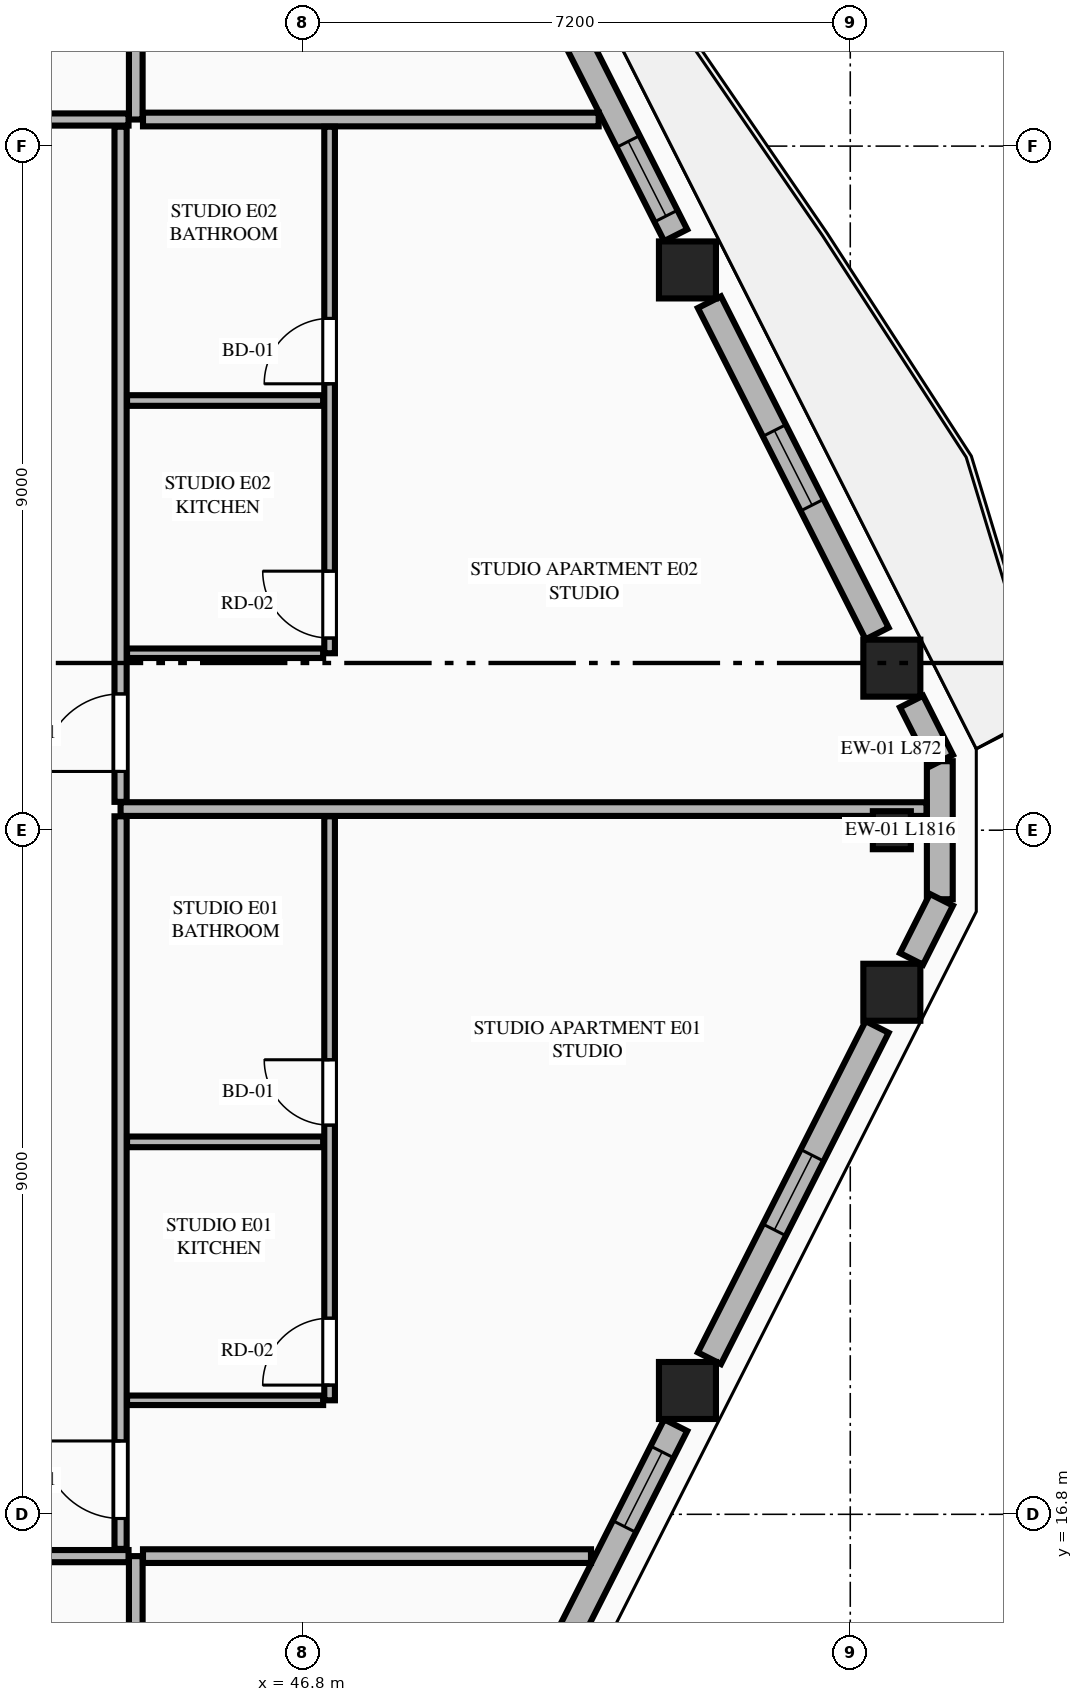
"""IFC4 building model, lengths in metres.
Left out: names, types, materials, properties, quantities, classifications, styles, units other than length and angle.
Written with IfcOpenShell. Run it as: python <this file> out.ifc"""

import sys

from ifc_helpers import new_model, si_unit, direction, frame, frame_2d, origin, origin_2d, place, context, subcontext, project, spatial, rectangle, extrude, element, fill, save


model = new_model("IFC4")
c1 = context("Model", 3, precision=1e-05, world=origin(), true_north=direction((0.0, 1.0)))
c2 = subcontext(c1, "Body", "Model", "MODEL_VIEW")
j1 = project(units=[si_unit("LENGTHUNIT", "METRE"), si_unit("PLANEANGLEUNIT", "RADIAN")], contexts=[c1])
p1 = place(None, origin())
s1 = spatial("IfcSite", under=j1, at=p1, CompositionType="ELEMENT")
p2 = place(p1, origin())
s2 = spatial("IfcBuilding", under=s1, at=p2, CompositionType="ELEMENT")
p3 = place(p2, frame((0.0, 0.0, 218.05)))
s3 = spatial("IfcBuildingStorey", under=s2, at=p3, CompositionType="ELEMENT", Elevation=218.05)
for number, where, z_axis, x_axis in (
    (1, (51.858, 18.429, 0.0), (0.0, 0.0, 1.0), (1.0, 0.0, 0.0)),
    (2, (54.547, 23.668, 0.0), (0.0, 0.0, 1.0), (1.0, 0.0, 0.0)),
    (3, (54.547, 27.932, 0.0), (0.0, 0.0, 1.0), (1.0, 0.0, 0.0)),
    (4, (51.858, 33.171, 0.0), (0.0, 0.0, 1.0), (1.0, 0.0, 0.0)),
):
    element("IfcColumn", number, at=place(p3, frame(where, z_axis=z_axis, x_axis=x_axis)), inside=s3, PredefinedType="COLUMN", context=c2, shape_type="SweptSolid", body=[
        extrude(rectangle(XDim=0.75, YDim=0.75, at=origin_2d()), origin(), (0.0, 0.0, 1.0), 3.55),
    ])
p4 = place(p3, frame((54.547, 25.8, 0.0), z_axis=(0.0, 0.0, 1.0), x_axis=(0.0, 1.0, 0.0)))
e5 = element("IfcColumn", 5, at=p4, inside=s3, PredefinedType="PILASTER", context=c2, shape_type="SweptSolid", body=[
    extrude(rectangle(XDim=0.5, YDim=0.35, at=origin_2d()), origin(), (0.0, 0.0, 1.0), 3.55),
])
p5 = place(p3, frame((55.178, 24.892, 0.0), z_axis=(0.0, 0.0, 1.0), x_axis=(0.0, 1.0, 0.0)))
e6 = element("IfcWall", 6, at=p5, inside=s3, PredefinedType="STANDARD", context=c2, shape_type="SweptSolid", body=[
    extrude(rectangle(XDim=1.816, YDim=0.34, at=frame_2d((0.908, 0.0))), origin(), (0.0, 0.0, 1.0), 3.27),
])
p6 = place(p3, frame((49.403, 13.427, 0.0), z_axis=(0.0, 0.0, 1.0), x_axis=(0.451425765525, 0.892308678777, 0.0)))
e7 = element("IfcWall", 7, at=p6, inside=s3, PredefinedType="STANDARD", context=c2, shape_type="SweptSolid", body=[
    extrude(rectangle(XDim=5.094, YDim=0.34, at=frame_2d((2.547, 0.0))), origin(), (0.0, 0.0, 1.0), 2.803),
])
p7 = place(p6, frame((0.902, 0.0, 0.75)))
e8 = element("IfcOpeningElement", 8, at=p7, cuts=e7, PredefinedType="OPENING", context=c2, shape_type="SweptSolid", body=[
    extrude(rectangle(XDim=1.1, YDim=1.903, at=frame_2d((0.55, 0.952))), frame((0.0, 0.18, 0.0), z_axis=(0.0, -1.0, 0.0), x_axis=(1.0, 0.0, 0.0)), (0.0, 0.0, 1.0), 0.36),
])
p8 = place(p6, frame((3.6, 0.0, 0.75)))
e9 = element("IfcOpeningElement", 9, at=p8, cuts=e7, PredefinedType="OPENING", context=c2, shape_type="SweptSolid", body=[
    extrude(rectangle(XDim=1.1, YDim=1.903, at=frame_2d((0.55, 0.952))), frame((0.0, 0.18, 0.0), z_axis=(0.0, -1.0, 0.0), x_axis=(1.0, 0.0, 0.0)), (0.0, 0.0, 1.0), 0.36),
])
p9 = place(p3, frame((52.147, 18.853, 0.0), z_axis=(0.0, 0.0, 1.0), x_axis=(0.451566029745, 0.892237704191, 0.0)))
e10 = element("IfcWall", 10, at=p9, inside=s3, PredefinedType="STANDARD", context=c2, shape_type="SweptSolid", body=[
    extrude(rectangle(XDim=4.885, YDim=0.34, at=frame_2d((2.443, 0.0))), origin(), (0.0, 0.0, 1.0), 2.803),
])
p10 = place(p9, frame((1.893, 0.0, 0.75)))
e11 = element("IfcOpeningElement", 11, at=p10, cuts=e10, PredefinedType="OPENING", context=c2, shape_type="SweptSolid", body=[
    extrude(rectangle(XDim=1.1, YDim=1.903, at=frame_2d((0.55, 0.952))), frame((0.0, 0.18, 0.0), z_axis=(0.0, -1.0, 0.0), x_axis=(1.0, 0.0, 0.0)), (0.0, 0.0, 1.0), 0.36),
])
p11 = place(p3, frame((54.806, 24.107, 0.0), z_axis=(0.0, 0.0, 1.0), x_axis=(0.450906649871, 0.892571113751, 0.0)))
e12 = element("IfcWall", 12, at=p11, inside=s3, PredefinedType="STANDARD", context=c2, shape_type="SweptSolid", body=[
    extrude(rectangle(XDim=0.872, YDim=0.34, at=frame_2d((0.436, 0.0))), origin(), (0.0, 0.0, 1.0), 3.27),
])
p12 = place(p3, frame((55.199, 26.715, 0.0), z_axis=(0.0, 0.0, 1.0), x_axis=(-0.451019391667, 0.892514150218, 0.0)))
e13 = element("IfcWall", 13, at=p12, inside=s3, PredefinedType="STANDARD", context=c2, shape_type="SweptSolid", body=[
    extrude(rectangle(XDim=0.872, YDim=0.34, at=frame_2d((0.436, 0.0))), origin(), (0.0, 0.0, 1.0), 3.27),
])
p13 = place(p3, frame((54.353, 28.388, 0.0), z_axis=(0.0, 0.0, 1.0), x_axis=(-0.451545895749, 0.892247893824, 0.0)))
e14 = element("IfcWall", 14, at=p13, inside=s3, PredefinedType="STANDARD", context=c2, shape_type="SweptSolid", body=[
    extrude(rectangle(XDim=4.885, YDim=0.34, at=frame_2d((2.443, 0.0))), origin(), (0.0, 0.0, 1.0), 2.803),
])
p14 = place(p13, frame((1.893, 0.0, 0.75)))
e15 = element("IfcOpeningElement", 15, at=p14, cuts=e14, PredefinedType="OPENING", context=c2, shape_type="SweptSolid", body=[
    extrude(rectangle(XDim=1.1, YDim=1.903, at=frame_2d((0.55, 0.952))), frame((0.0, 0.18, 0.0), z_axis=(0.0, -1.0, 0.0), x_axis=(1.0, 0.0, 0.0)), (0.0, 0.0, 1.0), 0.36),
])
p15 = place(p3, frame((51.703, 33.627, 0.0), z_axis=(0.0, 0.0, 1.0), x_axis=(-0.451406462707, 0.892318443957, 0.0)))
e16 = element("IfcWall", 16, at=p15, inside=s3, PredefinedType="STANDARD", context=c2, shape_type="SweptSolid", body=[
    extrude(rectangle(XDim=5.095, YDim=0.34, at=frame_2d((2.547, 0.0))), origin(), (0.0, 0.0, 1.0), 2.803),
])
p16 = place(p15, frame((2.976, 0.0, 0.0)))
e17 = element("IfcOpeningElement", 17, at=p16, cuts=e16, PredefinedType="OPENING", context=c2, shape_type="SweptSolid", body=[
    extrude(rectangle(XDim=1.1, YDim=2.25, at=frame_2d((0.55, 1.125))), frame((0.0, 0.18, 0.0), z_axis=(0.0, -1.0, 0.0), x_axis=(1.0, 0.0, 0.0)), (0.0, 0.0, 1.0), 0.36),
])
p17 = place(p15, frame((0.283, 0.0, 0.75)))
e18 = element("IfcOpeningElement", 18, at=p17, cuts=e16, PredefinedType="OPENING", context=c2, shape_type="SweptSolid", body=[
    extrude(rectangle(XDim=1.1, YDim=1.903, at=frame_2d((0.55, 0.952))), frame((0.0, 0.18, 0.0), z_axis=(0.0, -1.0, 0.0), x_axis=(1.0, 0.0, 0.0)), (0.0, 0.0, 1.0), 0.36),
])
p18 = place(p3, frame((44.6, 5.968, 0.0), z_axis=(0.0, 0.0, 1.0), x_axis=(0.0, 1.0, 0.0)))
e19 = element("IfcWall", 19, at=p18, inside=s3, PredefinedType="PARTITIONING", context=c2, shape_type="SweptSolid", body=[
    extrude(rectangle(XDim=10.282, YDim=0.18, at=frame_2d((5.141, 0.0))), origin(), (0.0, 0.0, 1.0), 3.27),
])
p19 = place(p3, frame((20.295, 16.25, 0.0), z_axis=(0.0, 0.0, 1.0), x_axis=(1.0, 0.0, 0.0)))
e20 = element("IfcWall", 20, at=p19, inside=s3, PredefinedType="PARTITIONING", context=c2, shape_type="SweptSolid", body=[
    extrude(rectangle(XDim=24.21, YDim=0.16, at=frame_2d((12.105, 0.0))), origin(), (0.0, 0.0, 1.0), 3.27),
])
p20 = place(p19, frame((0.705, 0.0, 0.0)))
e21 = element("IfcOpeningElement", 21, at=p20, cuts=e20, PredefinedType="OPENING", context=c2, shape_type="SweptSolid", body=[
    extrude(rectangle(XDim=1.02, YDim=2.25, at=frame_2d((0.51, 1.125))), frame((0.0, 0.09, 0.0), z_axis=(0.0, -1.0, 0.0), x_axis=(1.0, 0.0, 0.0)), (0.0, 0.0, 1.0), 0.18),
])
p21 = place(p3, frame((44.6, 35.15, 0.0), z_axis=(0.0, 0.0, 1.0), x_axis=(0.0, 1.0, 0.0)))
e22 = element("IfcWall", 22, at=p21, inside=s3, PredefinedType="PARTITIONING", context=c2, shape_type="SweptSolid", body=[
    extrude(rectangle(XDim=10.482, YDim=0.18, at=frame_2d((5.241, 0.0))), origin(), (0.0, 0.0, 1.0), 3.27),
])
p22 = place(p3, frame((20.295, 35.15, 0.0), z_axis=(0.0, 0.0, 1.0), x_axis=(1.0, 0.0, 0.0)))
e23 = element("IfcWall", 23, at=p22, inside=s3, PredefinedType="PARTITIONING", context=c2, shape_type="SweptSolid", body=[
    extrude(rectangle(XDim=24.21, YDim=0.16, at=frame_2d((12.105, 0.0))), origin(), (0.0, 0.0, 1.0), 3.27),
])
p23 = place(p22, frame((0.405, 0.0, 0.0)))
e24 = element("IfcOpeningElement", 24, at=p23, cuts=e23, PredefinedType="OPENING", context=c2, shape_type="SweptSolid", body=[
    extrude(rectangle(XDim=1.35, YDim=2.35, at=frame_2d((0.675, 1.175))), frame((0.0, 0.09, 0.0), z_axis=(0.0, -1.0, 0.0), x_axis=(1.0, 0.0, 0.0)), (0.0, 0.0, 1.0), 0.18),
])
p24 = place(p3, frame((44.695, 16.25, 0.0), z_axis=(0.0, 0.0, 1.0), x_axis=(1.0, 0.0, 0.0)))
e25 = element("IfcWall", 25, at=p24, inside=s3, PredefinedType="PARTITIONING", context=c2, shape_type="SweptSolid", body=[
    extrude(rectangle(XDim=5.894, YDim=0.18, at=frame_2d((2.947, 0.0))), origin(), (0.0, 0.0, 1.0), 3.27),
])
p25 = place(p3, frame((44.695, 35.15, 0.0), z_axis=(0.0, 0.0, 1.0), x_axis=(1.0, 0.0, 0.0)))
e26 = element("IfcWall", 26, at=p25, inside=s3, PredefinedType="PARTITIONING", context=c2, shape_type="SweptSolid", body=[
    extrude(rectangle(XDim=5.995, YDim=0.18, at=frame_2d((2.998, 0.0))), origin(), (0.0, 0.0, 1.0), 3.27),
])
p26 = place(p3, frame((44.4, 16.345, 0.0), z_axis=(0.0, 0.0, 1.0), x_axis=(0.0, 1.0, 0.0)))
e27 = element("IfcWall", 27, at=p26, inside=s3, PredefinedType="PARTITIONING", context=c2, shape_type="SweptSolid", body=[
    extrude(rectangle(XDim=9.638, YDim=0.16, at=frame_2d((4.819, 0.0))), origin(), (0.0, 0.0, 1.0), 3.27),
])
p27 = place(p26, frame((0.4, 0.0, 0.0)))
e28 = element("IfcOpeningElement", 28, at=p27, cuts=e27, PredefinedType="OPENING", context=c2, shape_type="SweptSolid", body=[
    extrude(rectangle(XDim=1.02, YDim=2.25, at=frame_2d((0.51, 1.125))), frame((0.0, 0.09, 0.0), z_axis=(0.0, -1.0, 0.0), x_axis=(1.0, 0.0, 0.0)), (0.0, 0.0, 1.0), 0.18),
])
p28 = place(p3, frame((44.485, 18.3, 0.0), z_axis=(0.0, 0.0, 1.0), x_axis=(1.0, 0.0, 0.0)))
e29 = element("IfcWall", 29, at=p28, inside=s3, PredefinedType="PARTITIONING", context=c2, shape_type="SweptSolid", body=[
    extrude(rectangle(XDim=2.58, YDim=0.125, at=frame_2d((1.29, 0.0))), origin(), (0.0, 0.0, 1.0), 2.727),
])
p29 = place(p3, frame((47.15, 18.3, 0.0), z_axis=(0.0, 0.0, 1.0), x_axis=(0.0, 1.0, 0.0)))
e30 = element("IfcWall", 30, at=p29, inside=s3, PredefinedType="PLUMBINGWALL", context=c2, shape_type="SweptSolid", body=[
    extrude(rectangle(XDim=7.683, YDim=0.14, at=frame_2d((3.841, 0.0))), origin(), (0.0, 0.0, 1.0), 3.27),
])
p30 = place(p29, frame((3.62, 0.0, 0.0)))
e31 = element("IfcOpeningElement", 31, at=p30, cuts=e30, PredefinedType="OPENING", context=c2, shape_type="SweptSolid", body=[
    extrude(rectangle(XDim=0.86, YDim=2.1, at=frame_2d((0.43, 1.05))), frame((0.0, 0.08, 0.0), z_axis=(0.0, -1.0, 0.0), x_axis=(1.0, 0.0, 0.0)), (0.0, 0.0, 1.0), 0.16),
])
p31 = place(p29, frame((0.2, 0.0, 0.0)))
e32 = element("IfcOpeningElement", 32, at=p31, cuts=e30, PredefinedType="OPENING", context=c2, shape_type="SweptSolid", body=[
    extrude(rectangle(XDim=0.88, YDim=2.15, at=frame_2d((0.44, 1.075))), frame((0.0, 0.08, 0.0), z_axis=(0.0, -1.0, 0.0), x_axis=(1.0, 0.0, 0.0)), (0.0, 0.0, 1.0), 0.16),
])
p32 = place(p3, frame((44.485, 21.7, 0.0), z_axis=(0.0, 0.0, 1.0), x_axis=(1.0, 0.0, 0.0)))
e33 = element("IfcWall", 33, at=p32, inside=s3, PredefinedType="PLUMBINGWALL", context=c2, shape_type="SweptSolid", body=[
    extrude(rectangle(XDim=2.58, YDim=0.14, at=frame_2d((1.29, 0.0))), origin(), (0.0, 0.0, 1.0), 3.27),
])
p33 = place(p3, frame((44.4, 26.078, 0.0), z_axis=(0.0, 0.0, 1.0), x_axis=(1.0, 0.0, 0.0)))
e34 = element("IfcWall", 34, at=p33, inside=s3, PredefinedType="PARTITIONING", context=c2, shape_type="SweptSolid", body=[
    extrude(rectangle(XDim=10.603, YDim=0.18, at=frame_2d((5.302, 0.0))), origin(), (0.0, 0.0, 1.0), 3.27),
])
p34 = place(p3, frame((44.4, 26.173, 0.0), z_axis=(0.0, 0.0, 1.0), x_axis=(0.0, 1.0, 0.0)))
e35 = element("IfcWall", 35, at=p34, inside=s3, PredefinedType="PARTITIONING", context=c2, shape_type="SweptSolid", body=[
    extrude(rectangle(XDim=8.882, YDim=0.16, at=frame_2d((4.441, 0.0))), origin(), (0.0, 0.0, 1.0), 3.27),
])
p35 = place(p34, frame((0.4, 0.0, 0.0)))
e36 = element("IfcOpeningElement", 36, at=p35, cuts=e35, PredefinedType="OPENING", context=c2, shape_type="SweptSolid", body=[
    extrude(rectangle(XDim=1.02, YDim=2.25, at=frame_2d((0.51, 1.125))), frame((0.0, 0.09, 0.0), z_axis=(0.0, -1.0, 0.0), x_axis=(1.0, 0.0, 0.0)), (0.0, 0.0, 1.0), 0.18),
])
p36 = place(p3, frame((44.485, 28.128, 0.0), z_axis=(0.0, 0.0, 1.0), x_axis=(1.0, 0.0, 0.0)))
e37 = element("IfcWall", 37, at=p36, inside=s3, PredefinedType="PARTITIONING", context=c2, shape_type="SweptSolid", body=[
    extrude(rectangle(XDim=2.58, YDim=0.125, at=frame_2d((1.29, 0.0))), origin(), (0.0, 0.0, 1.0), 3.27),
])
p37 = place(p3, frame((47.15, 28.128, 0.0), z_axis=(0.0, 0.0, 1.0), x_axis=(0.0, 1.0, 0.0)))
e38 = element("IfcWall", 38, at=p37, inside=s3, PredefinedType="PLUMBINGWALL", context=c2, shape_type="SweptSolid", body=[
    extrude(rectangle(XDim=6.927, YDim=0.14, at=frame_2d((3.463, 0.0))), origin(), (0.0, 0.0, 1.0), 3.27),
])
p38 = place(p37, frame((3.545, 0.0, 0.0)))
e39 = element("IfcOpeningElement", 39, at=p38, cuts=e38, PredefinedType="OPENING", context=c2, shape_type="SweptSolid", body=[
    extrude(rectangle(XDim=0.86, YDim=2.1, at=frame_2d((0.43, 1.05))), frame((0.0, 0.08, 0.0), z_axis=(0.0, -1.0, 0.0), x_axis=(1.0, 0.0, 0.0)), (0.0, 0.0, 1.0), 0.16),
])
p39 = place(p37, frame((0.2, 0.0, 0.0)))
e40 = element("IfcOpeningElement", 40, at=p39, cuts=e38, PredefinedType="OPENING", context=c2, shape_type="SweptSolid", body=[
    extrude(rectangle(XDim=0.88, YDim=2.15, at=frame_2d((0.44, 1.075))), frame((0.0, 0.08, 0.0), z_axis=(0.0, -1.0, 0.0), x_axis=(1.0, 0.0, 0.0)), (0.0, 0.0, 1.0), 0.16),
])
p40 = place(p3, frame((44.485, 31.453, 0.0), z_axis=(0.0, 0.0, 1.0), x_axis=(1.0, 0.0, 0.0)))
e41 = element("IfcWall", 41, at=p40, inside=s3, PredefinedType="PLUMBINGWALL", context=c2, shape_type="SweptSolid", body=[
    extrude(rectangle(XDim=2.58, YDim=0.14, at=frame_2d((1.29, 0.0))), origin(), (0.0, 0.0, 1.0), 3.27),
])
p41 = place(p10, origin())
e42 = element("IfcWindow", 42, at=p41, inside=s3, PartitioningType="SINGLE_PANEL", PredefinedType="WINDOW", context=c2, shape_type="SweptSolid", body=[
    extrude(rectangle(XDim=1.1, YDim=1.903, at=frame_2d((0.55, 0.952))), frame((0.0, 0.03, 0.0), z_axis=(0.0, -1.0, 0.0), x_axis=(1.0, 0.0, 0.0)), (0.0, 0.0, 1.0), 0.06),
])
fill(e11, e42)
p42 = place(p14, origin())
e43 = element("IfcWindow", 43, at=p42, inside=s3, PartitioningType="SINGLE_PANEL", PredefinedType="WINDOW", context=c2, shape_type="SweptSolid", body=[
    extrude(rectangle(XDim=1.1, YDim=1.903, at=frame_2d((0.55, 0.952))), frame((0.0, 0.03, 0.0), z_axis=(0.0, -1.0, 0.0), x_axis=(1.0, 0.0, 0.0)), (0.0, 0.0, 1.0), 0.06),
])
fill(e15, e43)
p43 = place(p30, origin())
e44 = element("IfcDoor", 44, at=p43, inside=s3, OperationType="SINGLE_SWING_RIGHT", PredefinedType="DOOR", context=c2, shape_type="SweptSolid", body=[
    extrude(rectangle(XDim=0.86, YDim=2.1, at=frame_2d((0.43, 1.05))), frame((0.0, 0.025, 0.0), z_axis=(0.0, -1.0, 0.0), x_axis=(1.0, 0.0, 0.0)), (0.0, 0.0, 1.0), 0.05),
])
fill(e31, e44)
p44 = place(p27, origin())
e45 = element("IfcDoor", 45, at=p44, inside=s3, OperationType="SINGLE_SWING_RIGHT", PredefinedType="DOOR", context=c2, shape_type="SweptSolid", body=[
    extrude(rectangle(XDim=1.02, YDim=2.25, at=frame_2d((0.51, 1.125))), frame((0.0, 0.025, 0.0), z_axis=(0.0, -1.0, 0.0), x_axis=(1.0, 0.0, 0.0)), (0.0, 0.0, 1.0), 0.05),
])
fill(e28, e45)
p45 = place(p31, origin())
e46 = element("IfcDoor", 46, at=p45, inside=s3, OperationType="SINGLE_SWING_LEFT", PredefinedType="DOOR", context=c2, shape_type="SweptSolid", body=[
    extrude(rectangle(XDim=0.88, YDim=2.15, at=frame_2d((0.44, 1.075))), frame((0.0, 0.025, 0.0), z_axis=(0.0, -1.0, 0.0), x_axis=(1.0, 0.0, 0.0)), (0.0, 0.0, 1.0), 0.05),
])
fill(e32, e46)
p46 = place(p38, origin())
e47 = element("IfcDoor", 47, at=p46, inside=s3, OperationType="SINGLE_SWING_LEFT", PredefinedType="DOOR", context=c2, shape_type="SweptSolid", body=[
    extrude(rectangle(XDim=0.86, YDim=2.1, at=frame_2d((0.43, 1.05))), frame((0.0, 0.025, 0.0), z_axis=(0.0, -1.0, 0.0), x_axis=(1.0, 0.0, 0.0)), (0.0, 0.0, 1.0), 0.05),
])
fill(e39, e47)
p47 = place(p35, origin())
e48 = element("IfcDoor", 48, at=p47, inside=s3, OperationType="SINGLE_SWING_LEFT", PredefinedType="DOOR", context=c2, shape_type="SweptSolid", body=[
    extrude(rectangle(XDim=1.02, YDim=2.25, at=frame_2d((0.51, 1.125))), frame((0.0, 0.025, 0.0), z_axis=(0.0, -1.0, 0.0), x_axis=(1.0, 0.0, 0.0)), (0.0, 0.0, 1.0), 0.05),
])
fill(e36, e48)
p48 = place(p39, origin())
e49 = element("IfcDoor", 49, at=p48, inside=s3, OperationType="SINGLE_SWING_RIGHT", PredefinedType="DOOR", context=c2, shape_type="SweptSolid", body=[
    extrude(rectangle(XDim=0.88, YDim=2.15, at=frame_2d((0.44, 1.075))), frame((0.0, 0.025, 0.0), z_axis=(0.0, -1.0, 0.0), x_axis=(1.0, 0.0, 0.0)), (0.0, 0.0, 1.0), 0.05),
])
fill(e40, e49)
p49 = place(p8, origin())
e50 = element("IfcWindow", 50, at=p49, inside=s3, PartitioningType="SINGLE_PANEL", PredefinedType="WINDOW", context=c2, shape_type="SweptSolid", body=[
    extrude(rectangle(XDim=1.1, YDim=1.903, at=frame_2d((0.55, 0.952))), frame((0.0, 0.03, 0.0), z_axis=(0.0, -1.0, 0.0), x_axis=(1.0, 0.0, 0.0)), (0.0, 0.0, 1.0), 0.06),
])
fill(e9, e50)
p50 = place(p17, origin())
e51 = element("IfcWindow", 51, at=p50, inside=s3, PartitioningType="SINGLE_PANEL", PredefinedType="WINDOW", context=c2, shape_type="SweptSolid", body=[
    extrude(rectangle(XDim=1.1, YDim=1.903, at=frame_2d((0.55, 0.952))), frame((0.0, 0.03, 0.0), z_axis=(0.0, -1.0, 0.0), x_axis=(1.0, 0.0, 0.0)), (0.0, 0.0, 1.0), 0.06),
])
fill(e18, e51)
save(model, sys.argv[1])
